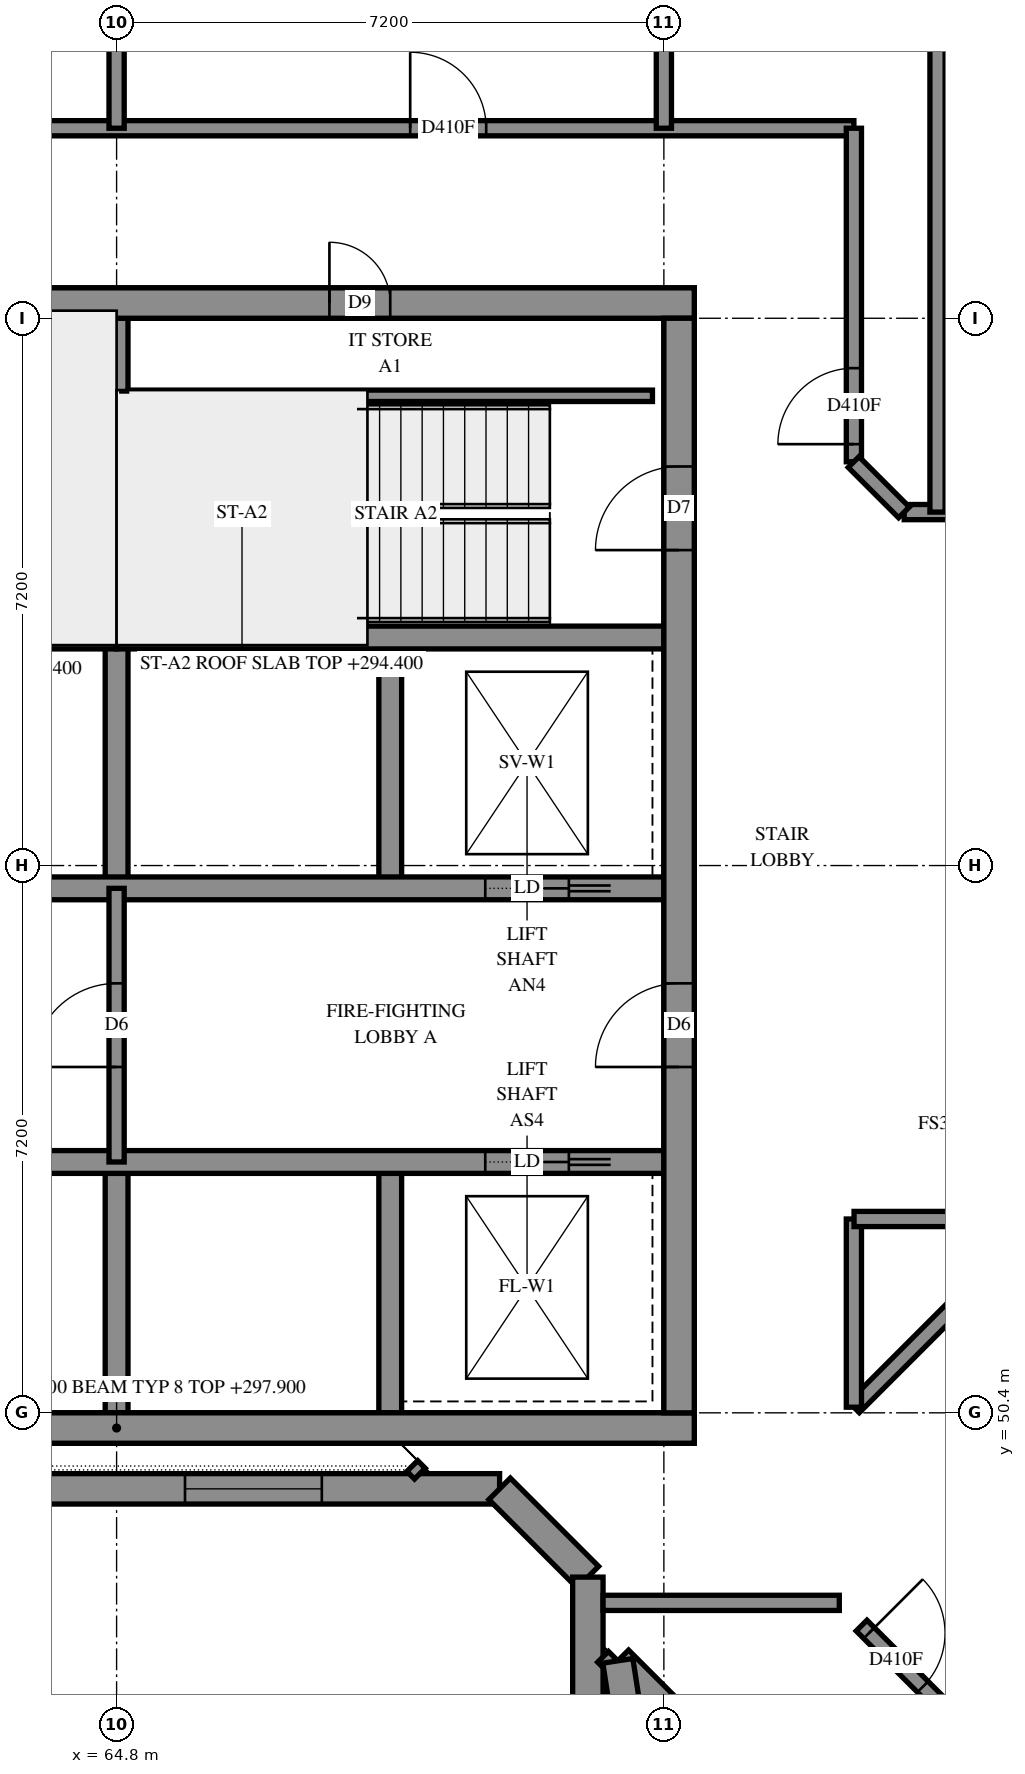
"""IFC4 building model, lengths in metres.
Left out: names, types, materials, properties, quantities, classifications, styles, units other than length and angle.
Written with IfcOpenShell. Run it as: python <this file> out.ifc"""

import sys

from ifc_helpers import new_model, si_unit, direction, frame, frame_2d, origin, place, context, subcontext, project, spatial, polyline, rectangle, outline, extrude, element, fill, save


model = new_model("IFC4")
c1 = context("Model", 3, precision=1e-05, world=origin(), true_north=direction((0.0, 1.0)))
c2 = subcontext(c1, "Body", "Model", "MODEL_VIEW")
j1 = project(units=[si_unit("LENGTHUNIT", "METRE"), si_unit("PLANEANGLEUNIT", "RADIAN")], contexts=[c1])
p1 = place(None, origin())
s1 = spatial("IfcSite", under=j1, at=p1, CompositionType="ELEMENT")
p2 = place(p1, origin())
s2 = spatial("IfcBuilding", under=s1, at=p2, CompositionType="ELEMENT")
p3 = place(p2, frame((0.0, 0.0, 294.4)))
s3 = spatial("IfcBuildingStorey", under=s2, at=p3, CompositionType="ELEMENT", Elevation=294.4)
p4 = place(p3, frame((57.2, 50.2, -0.3), z_axis=(0.0, 0.0, 1.0), x_axis=(1.0, 0.0, 0.0)))
e1 = element("IfcWall", 1, at=p4, inside=s3, PredefinedType="SHEAR", context=c2, shape_type="SweptSolid", body=[
    extrude(outline(polyline([(0.0, 0.0), (15.2, 0.0), (15.2, 3.1), (0.0, 3.1), (0.0, 0.0)])), frame((0.0, 0.2, 0.0), z_axis=(0.0, -1.0, 0.0), x_axis=(1.0, 0.0, 0.0)), (0.0, 0.0, 1.0), 0.4),
])
p5 = place(p3, frame((57.2, 65.0, -0.3), z_axis=(0.0, 0.0, 1.0), x_axis=(1.0, 0.0, 0.0)))
e2 = element("IfcWall", 2, at=p5, inside=s3, PredefinedType="SHEAR", context=c2, shape_type="SweptSolid", body=[
    extrude(outline(polyline([(0.0, 0.0), (15.2, 0.0), (15.2, 3.1), (0.0, 3.1), (0.0, 0.0)])), frame((0.0, 0.2, 0.0), z_axis=(0.0, -1.0, 0.0), x_axis=(1.0, 0.0, 0.0)), (0.0, 0.0, 1.0), 0.4),
])
p6 = place(p5, frame((10.4, 0.0, 0.3)))
e3 = element("IfcOpeningElement", 3, at=p6, cuts=e2, PredefinedType="OPENING", context=c2, shape_type="SweptSolid", body=[
    extrude(rectangle(XDim=0.8, YDim=2.1, at=frame_2d((0.4, 1.05))), frame((0.0, 0.21, 0.0), z_axis=(0.0, -1.0, 0.0), x_axis=(1.0, 0.0, 0.0)), (0.0, 0.0, 1.0), 0.42),
])
p7 = place(p3, frame((72.2, 50.4, -0.3), z_axis=(0.0, 0.0, 1.0), x_axis=(0.0, 1.0, 0.0)))
e4 = element("IfcWall", 4, at=p7, inside=s3, PredefinedType="SHEAR", context=c2, shape_type="SweptSolid", body=[
    extrude(outline(polyline([(0.0, 0.0), (14.4, 0.0), (14.4, 3.1), (0.0, 3.1), (0.0, 0.0)])), frame((0.0, 0.2, 0.0), z_axis=(0.0, -1.0, 0.0), x_axis=(1.0, 0.0, 0.0)), (0.0, 0.0, 1.0), 0.4),
])
p8 = place(p7, frame((4.55, 0.0, 0.3)))
e5 = element("IfcOpeningElement", 5, at=p8, cuts=e4, PredefinedType="OPENING", context=c2, shape_type="SweptSolid", body=[
    extrude(rectangle(XDim=1.1, YDim=2.1, at=frame_2d((0.55, 1.05))), frame((0.0, 0.21, 0.0), z_axis=(0.0, -1.0, 0.0), x_axis=(1.0, 0.0, 0.0)), (0.0, 0.0, 1.0), 0.42),
])
p9 = place(p7, frame((11.35, 0.0, 0.3)))
e6 = element("IfcOpeningElement", 6, at=p9, cuts=e4, PredefinedType="OPENING", context=c2, shape_type="SweptSolid", body=[
    extrude(rectangle(XDim=1.1, YDim=2.1, at=frame_2d((0.55, 1.05))), frame((0.0, 0.21, 0.0), z_axis=(0.0, -1.0, 0.0), x_axis=(1.0, 0.0, 0.0)), (0.0, 0.0, 1.0), 0.42),
])
for number, where, z_axis, x_axis in (
    (7, (64.8, 50.4, 0.0), (0.0, 0.0, 1.0), (0.0, 1.0, 0.0)),
    (8, (64.8, 57.3, 0.0), (0.0, 0.0, 1.0), (0.0, 1.0, 0.0)),
    (9, (68.4, 50.4, 0.0), (0.0, 0.0, 1.0), (0.0, 1.0, 0.0)),
    (10, (68.4, 57.3, 0.0), (0.0, 0.0, 1.0), (0.0, 1.0, 0.0)),
):
    element("IfcWall", number, at=place(p3, frame(where, z_axis=z_axis, x_axis=x_axis)), inside=s3, PredefinedType="SOLIDWALL", context=c2, shape_type="SweptSolid", body=[
        extrude(outline(polyline([(0.0, 0.0), (3.3, 0.0), (3.3, 3.5), (0.0, 3.5), (0.0, 0.0)])), frame((0.0, 0.15, 0.0), z_axis=(0.0, -1.0, 0.0), x_axis=(1.0, 0.0, 0.0)), (0.0, 0.0, 1.0), 0.3),
    ])
p10 = place(p3, frame((57.6, 53.7, 0.0), z_axis=(0.0, 0.0, 1.0), x_axis=(1.0, 0.0, 0.0)))
e11 = element("IfcWall", 11, at=p10, inside=s3, PredefinedType="SOLIDWALL", context=c2, shape_type="SweptSolid", body=[
    extrude(outline(polyline([(0.0, 0.0), (14.4, 0.0), (14.4, 3.5), (0.0, 3.5), (0.0, 0.0)])), frame((0.0, 0.15, 0.0), z_axis=(0.0, -1.0, 0.0), x_axis=(1.0, 0.0, 0.0)), (0.0, 0.0, 1.0), 0.3),
])
p11 = place(p10, frame((12.05, 0.0, 0.0)))
e12 = element("IfcOpeningElement", 12, at=p11, cuts=e11, PredefinedType="OPENING", context=c2, shape_type="SweptSolid", body=[
    extrude(rectangle(XDim=1.1, YDim=2.1, at=frame_2d((0.55, 1.05))), frame((0.0, 0.16, 0.0), z_axis=(0.0, -1.0, 0.0), x_axis=(1.0, 0.0, 0.0)), (0.0, 0.0, 1.0), 0.32),
])
p12 = place(p3, frame((57.6, 57.3, 0.0), z_axis=(0.0, 0.0, 1.0), x_axis=(1.0, 0.0, 0.0)))
e13 = element("IfcWall", 13, at=p12, inside=s3, PredefinedType="SOLIDWALL", context=c2, shape_type="SweptSolid", body=[
    extrude(outline(polyline([(0.0, 0.0), (14.4, 0.0), (14.4, 3.5), (0.0, 3.5), (0.0, 0.0)])), frame((0.0, 0.15, 0.0), z_axis=(0.0, -1.0, 0.0), x_axis=(1.0, 0.0, 0.0)), (0.0, 0.0, 1.0), 0.3),
])
p13 = place(p12, frame((12.05, 0.0, 0.0)))
e14 = element("IfcOpeningElement", 14, at=p13, cuts=e13, PredefinedType="OPENING", context=c2, shape_type="SweptSolid", body=[
    extrude(rectangle(XDim=1.1, YDim=2.1, at=frame_2d((0.55, 1.05))), frame((0.0, 0.16, 0.0), z_axis=(0.0, -1.0, 0.0), x_axis=(1.0, 0.0, 0.0)), (0.0, 0.0, 1.0), 0.32),
])
for number, where, z_axis, x_axis in (
    (15, (57.6, 60.6, 0.0), (0.0, 0.0, 1.0), (1.0, 0.0, 0.0)),
    (16, (64.8, 60.6, 0.0), (0.0, 0.0, 1.0), (1.0, 0.0, 0.0)),
):
    element("IfcWall", number, at=place(p3, frame(where, z_axis=z_axis, x_axis=x_axis)), inside=s3, PredefinedType="SOLIDWALL", context=c2, shape_type="SweptSolid", body=[
        extrude(outline(polyline([(0.0, 0.0), (7.2, 0.0), (7.2, 3.5), (0.0, 3.5), (0.0, 0.0)])), frame((0.0, 0.15, 0.0), z_axis=(0.0, -1.0, 0.0), x_axis=(1.0, 0.0, 0.0)), (0.0, 0.0, 1.0), 0.3),
    ])
p14 = place(p3, frame((64.8, 60.6, 0.0), z_axis=(0.0, 0.0, 1.0), x_axis=(0.0, 1.0, 0.0)))
e17 = element("IfcWall", 17, at=p14, inside=s3, PredefinedType="SOLIDWALL", context=c2, shape_type="SweptSolid", body=[
    extrude(outline(polyline([(0.0, 0.0), (4.2, 0.0), (4.2, 3.5), (0.0, 3.5), (0.0, 0.0)])), frame((0.0, 0.15, 0.0), z_axis=(0.0, -1.0, 0.0), x_axis=(1.0, 0.0, 0.0)), (0.0, 0.0, 1.0), 0.3),
])
p15 = place(p3, frame((56.6, 49.4, 0.0), z_axis=(0.0, 0.0, 1.0), x_axis=(1.0, 0.0, 0.0)))
e18 = element("IfcWall", 18, at=p15, inside=s3, PredefinedType="SOLIDWALL", context=c2, shape_type="SweptSolid", body=[
    extrude(outline(polyline([(-0.2, -0.2), (13.156, -0.2), (13.322, 0.2), (0.2, 0.2), (-0.2, -0.2)])), origin(), (0.0, 0.0, 1.0), 3.5),
])
p16 = place(p15, frame((1.9, 0.0, 0.7)))
e19 = element("IfcOpeningElement", 19, at=p16, cuts=e18, PredefinedType="OPENING", context=c2, shape_type="SweptSolid", body=[
    extrude(rectangle(XDim=1.8, YDim=2.2, at=frame_2d((0.9, 1.1))), frame((0.0, 0.21, 0.0), z_axis=(0.0, -1.0, 0.0), x_axis=(1.0, 0.0, 0.0)), (0.0, 0.0, 1.0), 0.42),
])
p17 = place(p15, frame((5.5, 0.0, 0.7)))
e20 = element("IfcOpeningElement", 20, at=p17, cuts=e18, PredefinedType="OPENING", context=c2, shape_type="SweptSolid", body=[
    extrude(rectangle(XDim=1.8, YDim=2.2, at=frame_2d((0.9, 1.1))), frame((0.0, 0.21, 0.0), z_axis=(0.0, -1.0, 0.0), x_axis=(1.0, 0.0, 0.0)), (0.0, 0.0, 1.0), 0.42),
])
p18 = place(p15, frame((9.1, 0.0, 0.7)))
e21 = element("IfcOpeningElement", 21, at=p18, cuts=e18, PredefinedType="OPENING", context=c2, shape_type="SweptSolid", body=[
    extrude(rectangle(XDim=1.8, YDim=2.2, at=frame_2d((0.9, 1.1))), frame((0.0, 0.21, 0.0), z_axis=(0.0, -1.0, 0.0), x_axis=(1.0, 0.0, 0.0)), (0.0, 0.0, 1.0), 0.42),
])
p19 = place(p3, frame((69.839, 49.4, 0.0), z_axis=(0.0, 0.0, 1.0), x_axis=(0.7071067812, -0.7071067812, 0.0)))
e22 = element("IfcWall", 22, at=p19, inside=s3, PredefinedType="SOLIDWALL", context=c2, shape_type="SweptSolid", body=[
    extrude(outline(polyline([(0.083, -0.2), (1.559, -0.2), (1.725, 0.2), (-0.083, 0.2), (0.083, -0.2)])), origin(), (0.0, 0.0, 1.0), 3.5),
])
p20 = place(p3, frame((71.0, 48.239, 0.0), z_axis=(0.0, 0.0, 1.0), x_axis=(0.0, -1.0, 0.0)))
e23 = element("IfcWall", 23, at=p20, inside=s3, PredefinedType="SOLIDWALL", context=c2, shape_type="SweptSolid", body=[
    extrude(outline(polyline([(0.083, -0.2), (6.239, -0.2), (5.839, 0.2), (-0.083, 0.2), (0.083, -0.2)])), origin(), (0.0, 0.0, 1.0), 3.5),
])
p21 = place(p20, frame((2.339, 0.0, 0.7)))
e24 = element("IfcOpeningElement", 24, at=p21, cuts=e23, PredefinedType="OPENING", context=c2, shape_type="SweptSolid", body=[
    extrude(rectangle(XDim=1.8, YDim=2.2, at=frame_2d((0.9, 1.1))), frame((0.0, 0.21, 0.0), z_axis=(0.0, -1.0, 0.0), x_axis=(1.0, 0.0, 0.0)), (0.0, 0.0, 1.0), 0.42),
])
p22 = place(p3, frame((68.79, 49.6, 0.0), z_axis=(0.0, 0.0, 1.0), x_axis=(-0.7071067812, 0.7071067812, 0.0)))
e25 = element("IfcWall", 25, at=p22, inside=s3, PredefinedType="PARAPET", context=c2, shape_type="SweptSolid", body=[
    extrude(outline(polyline([(0.0, -0.1), (0.141, -0.1), (0.141, 0.1), (0.0, 0.1), (0.0, -0.1)])), origin(), (0.0, 0.0, 1.0), 0.25),
])
p23 = place(p3, frame((75.99, 42.4, 0.0), z_axis=(0.0, 0.0, 1.0), x_axis=(-0.7071067812, 0.7071067812, 0.0)))
e26 = element("IfcWall", 26, at=p23, inside=s3, PredefinedType="PARAPET", context=c2, shape_type="SweptSolid", body=[
    extrude(outline(polyline([(0.0, -0.1), (6.774, -0.1), (6.774, 0.1), (0.0, 0.1), (0.0, -0.1)])), origin(), (0.0, 0.0, 1.0), 0.25),
])
p24 = place(p3, frame((64.95, 63.78, 0.0), z_axis=(0.0, 0.0, 1.0), x_axis=(1.0, 0.0, 0.0)))
e27 = element("IfcWall", 27, at=p24, inside=s3, PredefinedType="PARTITIONING", context=c2, shape_type="SweptSolid", body=[
    extrude(outline(polyline([(0.0, 0.0), (6.9, 0.0), (6.9, 3.5), (0.0, 3.5), (0.0, 0.0)])), frame((0.0, 0.075, 0.0), z_axis=(0.0, -1.0, 0.0), x_axis=(1.0, 0.0, 0.0)), (0.0, 0.0, 1.0), 0.15),
])
p25 = place(p3, frame((64.8, 53.7, 0.0), z_axis=(0.0, 0.0, 1.0), x_axis=(0.0, 1.0, 0.0)))
e28 = element("IfcWall", 28, at=p25, inside=s3, PredefinedType="PARTITIONING", context=c2, shape_type="SweptSolid", body=[
    extrude(outline(polyline([(0.0, 0.0), (3.6, 0.0), (3.6, 3.5), (0.0, 3.5), (0.0, 0.0)])), frame((0.0, 0.1, 0.0), z_axis=(0.0, -1.0, 0.0), x_axis=(1.0, 0.0, 0.0)), (0.0, 0.0, 1.0), 0.2),
])
p26 = place(p25, frame((1.25, 0.0, 0.0)))
e29 = element("IfcOpeningElement", 29, at=p26, cuts=e28, PredefinedType="OPENING", context=c2, shape_type="SweptSolid", body=[
    extrude(rectangle(XDim=1.1, YDim=2.1, at=frame_2d((0.55, 1.05))), frame((0.0, 0.11, 0.0), z_axis=(0.0, -1.0, 0.0), x_axis=(1.0, 0.0, 0.0)), (0.0, 0.0, 1.0), 0.22),
])
p27 = place(p3, frame((55.102, 67.3, 0.0), z_axis=(0.0, 0.0, 1.0), x_axis=(1.0, 0.0, 0.0)))
e30 = element("IfcWall", 30, at=p27, inside=s3, PredefinedType="PARTITIONING", context=c2, shape_type="SweptSolid", body=[
    extrude(rectangle(XDim=19.398, YDim=0.2, at=frame_2d((9.699, 0.0))), origin(), (0.0, 0.0, 1.0), 3.5),
])
p28 = place(p27, frame((6.361, 0.0, 0.0)))
e31 = element("IfcOpeningElement", 31, at=p28, cuts=e30, PredefinedType="OPENING", context=c2, shape_type="SweptSolid", body=[
    extrude(rectangle(XDim=1.0, YDim=2.1, at=frame_2d((0.5, 1.05))), frame((0.0, 0.11, 0.0), z_axis=(0.0, -1.0, 0.0), x_axis=(1.0, 0.0, 0.0)), (0.0, 0.0, 1.0), 0.22),
])
p29 = place(p27, frame((13.56, 0.0, 0.0)))
e32 = element("IfcOpeningElement", 32, at=p29, cuts=e30, PredefinedType="OPENING", context=c2, shape_type="SweptSolid", body=[
    extrude(rectangle(XDim=1.0, YDim=2.1, at=frame_2d((0.5, 1.05))), frame((0.0, 0.11, 0.0), z_axis=(0.0, -1.0, 0.0), x_axis=(1.0, 0.0, 0.0)), (0.0, 0.0, 1.0), 0.22),
])
p30 = place(p3, frame((74.5, 62.912, 0.0), z_axis=(0.0, 0.0, 1.0), x_axis=(0.0, 1.0, 0.0)))
e33 = element("IfcWall", 33, at=p30, inside=s3, PredefinedType="PARTITIONING", context=c2, shape_type="SweptSolid", body=[
    extrude(rectangle(XDim=4.388, YDim=0.2, at=frame_2d((2.194, 0.0))), origin(), (0.0, 0.0, 1.0), 3.5),
])
p31 = place(p30, frame((0.232, 0.0, 0.0)))
e34 = element("IfcOpeningElement", 34, at=p31, cuts=e33, PredefinedType="OPENING", context=c2, shape_type="SweptSolid", body=[
    extrude(rectangle(XDim=1.0, YDim=2.1, at=frame_2d((0.5, 1.05))), frame((0.0, 0.11, 0.0), z_axis=(0.0, -1.0, 0.0), x_axis=(1.0, 0.0, 0.0)), (0.0, 0.0, 1.0), 0.22),
])
for number, where, z_axis, x_axis in (
    (35, (64.8, 67.3, 0.0), (0.0, 0.0, 1.0), (0.0, 1.0, 0.0)),
    (36, (72.0, 67.3, 0.0), (0.0, 0.0, 1.0), (0.0, 1.0, 0.0)),
):
    element("IfcWall", number, at=place(p3, frame(where, z_axis=z_axis, x_axis=x_axis)), inside=s3, PredefinedType="PARTITIONING", context=c2, shape_type="SweptSolid", body=[
        extrude(rectangle(XDim=5.05, YDim=0.2, at=frame_2d((2.525, 0.0))), origin(), (0.0, 0.0, 1.0), 3.5),
    ])
p32 = place(p3, frame((74.601, 47.601, 0.0), z_axis=(0.0, 0.0, 1.0), x_axis=(0.7071067812, -0.7071067812, 0.0)))
e37 = element("IfcWall", 37, at=p32, inside=s3, PredefinedType="PARTITIONING", context=c2, shape_type="SweptSolid", body=[
    extrude(rectangle(XDim=4.237, YDim=0.2, at=frame_2d((2.119, 0.0))), origin(), (0.0, 0.0, 1.0), 3.5),
])
p33 = place(p32, frame((0.139, 0.0, 0.0)))
e38 = element("IfcOpeningElement", 38, at=p33, cuts=e37, PredefinedType="OPENING", context=c2, shape_type="SweptSolid", body=[
    extrude(rectangle(XDim=1.0, YDim=2.1, at=frame_2d((0.5, 1.05))), frame((0.0, 0.11, 0.0), z_axis=(0.0, -1.0, 0.0), x_axis=(1.0, 0.0, 0.0)), (0.0, 0.0, 1.0), 0.22),
])
p34 = place(p3, frame((75.162, 62.25, 0.0), z_axis=(0.0, 0.0, 1.0), x_axis=(1.0, 0.0, 0.0)))
e39 = element("IfcWall", 39, at=p34, inside=s3, PredefinedType="PARTITIONING", context=c2, shape_type="SweptSolid", body=[
    extrude(rectangle(XDim=4.038, YDim=0.2, at=frame_2d((2.019, 0.0))), origin(), (0.0, 0.0, 1.0), 3.5),
])
p35 = place(p34, frame((1.006, 0.0, 0.0)))
e40 = element("IfcOpeningElement", 40, at=p35, cuts=e39, PredefinedType="OPENING", context=c2, shape_type="SweptSolid", body=[
    extrude(rectangle(XDim=1.0, YDim=2.1, at=frame_2d((0.5, 1.05))), frame((0.0, 0.11, 0.0), z_axis=(0.0, -1.0, 0.0), x_axis=(1.0, 0.0, 0.0)), (0.0, 0.0, 1.0), 0.22),
])
p36 = place(p3, frame((74.501, 50.473, 0.0), z_axis=(0.0, 0.0, 1.0), x_axis=(0.7071067812, 0.7071067812, 0.0)))
e41 = element("IfcWall", 41, at=p36, inside=s3, PredefinedType="PARTITIONING", context=c2, shape_type="SweptSolid", body=[
    extrude(rectangle(XDim=3.502, YDim=0.2, at=frame_2d((1.751, 0.0))), origin(), (0.0, 0.0, 1.0), 3.5),
])
p37 = place(p3, frame((74.5, 50.474, 0.0), z_axis=(0.0, 0.0, 1.0), x_axis=(0.0, 1.0, 0.0)))
e42 = element("IfcWall", 42, at=p37, inside=s3, PredefinedType="PARTITIONING", context=c2, shape_type="SweptSolid", body=[
    extrude(rectangle(XDim=2.476, YDim=0.2, at=frame_2d((1.238, 0.0))), origin(), (0.0, 0.0, 1.0), 3.5),
])
p38 = place(p3, frame((74.502, 52.95, 0.0), z_axis=(0.0, 0.0, 1.0), x_axis=(1.0, 0.0, 0.0)))
e43 = element("IfcWall", 43, at=p38, inside=s3, PredefinedType="PARTITIONING", context=c2, shape_type="SweptSolid", body=[
    extrude(rectangle(XDim=2.474, YDim=0.2, at=frame_2d((1.237, 0.0))), origin(), (0.0, 0.0, 1.0), 3.5),
])
p39 = place(p3, frame((74.496, 62.908, 0.0), z_axis=(0.0, 0.0, 1.0), x_axis=(0.7071067812, -0.7071067812, 0.0)))
e44 = element("IfcWall", 44, at=p39, inside=s3, PredefinedType="PARTITIONING", context=c2, shape_type="SweptSolid", body=[
    extrude(rectangle(XDim=0.936, YDim=0.2, at=frame_2d((0.468, 0.0))), origin(), (0.0, 0.0, 1.0), 3.5),
])
p40 = place(p3, frame((75.6, 62.25, 0.0), z_axis=(0.0, 0.0, 1.0), x_axis=(0.0, 1.0, 0.0)))
e45 = element("IfcWall", 45, at=p40, inside=s3, PredefinedType="PARTITIONING", context=c2, shape_type="SweptSolid", body=[
    extrude(outline(polyline([(0.0, -0.1), (10.55, -0.1), (10.55, 0.1), (0.0, 0.1), (0.0, -0.1)])), origin(), (0.0, 0.0, 1.0), 3.5),
])
p41 = place(p3, frame((71.2, 47.9, 0.0), z_axis=(0.0, 0.0, 1.0), x_axis=(1.0, 0.0, 0.0)))
e46 = element("IfcWall", 46, at=p41, inside=s3, PredefinedType="PARTITIONING", context=c2, shape_type="SweptSolid", body=[
    extrude(outline(polyline([(0.0, -0.1), (3.108, -0.1), (3.108, 0.1), (0.0, 0.1), (0.0, -0.1)])), origin(), (0.0, 0.0, 1.0), 3.5),
])
p42 = place(p18, origin())
e47 = element("IfcWindow", 47, at=p42, inside=s3, PartitioningType="SINGLE_PANEL", PredefinedType="WINDOW", context=c2, shape_type="SweptSolid", body=[
    extrude(rectangle(XDim=1.8, YDim=2.2, at=frame_2d((0.9, 1.1))), frame((0.0, 0.08, 0.0), z_axis=(0.0, -1.0, 0.0), x_axis=(1.0, 0.0, 0.0)), (0.0, 0.0, 1.0), 0.06),
])
fill(e21, e47)
p43 = place(p6, origin())
e48 = element("IfcDoor", 48, at=p43, inside=s3, OperationType="SINGLE_SWING_RIGHT", PredefinedType="DOOR", context=c2, shape_type="SweptSolid", body=[
    extrude(rectangle(XDim=0.8, YDim=2.1, at=frame_2d((0.4, 1.05))), frame((0.0, 0.025, 0.0), z_axis=(0.0, -1.0, 0.0), x_axis=(1.0, 0.0, 0.0)), (0.0, 0.0, 1.0), 0.05),
])
fill(e3, e48)
p44 = place(p8, origin())
e49 = element("IfcDoor", 49, at=p44, inside=s3, OperationType="DOUBLE_DOOR_SINGLE_SWING", PredefinedType="DOOR", context=c2, shape_type="SweptSolid", body=[
    extrude(rectangle(XDim=1.1, YDim=2.1, at=frame_2d((0.55, 1.05))), frame((0.0, 0.025, 0.0), z_axis=(0.0, -1.0, 0.0), x_axis=(1.0, 0.0, 0.0)), (0.0, 0.0, 1.0), 0.05),
])
fill(e5, e49)
p45 = place(p9, origin())
e50 = element("IfcDoor", 50, at=p45, inside=s3, OperationType="SINGLE_SWING_RIGHT", PredefinedType="DOOR", context=c2, shape_type="SweptSolid", body=[
    extrude(rectangle(XDim=1.1, YDim=2.1, at=frame_2d((0.55, 1.05))), frame((0.0, 0.025, 0.0), z_axis=(0.0, -1.0, 0.0), x_axis=(1.0, 0.0, 0.0)), (0.0, 0.0, 1.0), 0.05),
])
fill(e6, e50)
p46 = place(p26, origin())
e51 = element("IfcDoor", 51, at=p46, inside=s3, OperationType="DOUBLE_DOOR_SINGLE_SWING", PredefinedType="DOOR", context=c2, shape_type="SweptSolid", body=[
    extrude(rectangle(XDim=1.1, YDim=2.1, at=frame_2d((0.55, 1.05))), frame((0.0, 0.025, 0.0), z_axis=(0.0, -1.0, 0.0), x_axis=(1.0, 0.0, 0.0)), (0.0, 0.0, 1.0), 0.05),
])
fill(e29, e51)
p47 = place(p11, origin())
e52 = element("IfcDoor", 52, at=p47, inside=s3, OperationType="SLIDING_TO_RIGHT", PredefinedType="DOOR", context=c2, shape_type="SweptSolid", body=[
    extrude(rectangle(XDim=1.1, YDim=2.1, at=frame_2d((0.55, 1.05))), frame((0.0, 0.025, 0.0), z_axis=(0.0, -1.0, 0.0), x_axis=(1.0, 0.0, 0.0)), (0.0, 0.0, 1.0), 0.05),
])
fill(e12, e52)
p48 = place(p13, origin())
e53 = element("IfcDoor", 53, at=p48, inside=s3, OperationType="SLIDING_TO_RIGHT", PredefinedType="DOOR", context=c2, shape_type="SweptSolid", body=[
    extrude(rectangle(XDim=1.1, YDim=2.1, at=frame_2d((0.55, 1.05))), frame((0.0, 0.025, 0.0), z_axis=(0.0, -1.0, 0.0), x_axis=(1.0, 0.0, 0.0)), (0.0, 0.0, 1.0), 0.05),
])
fill(e14, e53)
p49 = place(p33, origin())
e54 = element("IfcDoor", 54, at=p49, inside=s3, OperationType="SINGLE_SWING_LEFT", PredefinedType="DOOR", context=c2, shape_type="SweptSolid", body=[
    extrude(rectangle(XDim=1.0, YDim=2.1, at=frame_2d((0.5, 1.05))), frame((0.0, 0.025, 0.0), z_axis=(0.0, -1.0, 0.0), x_axis=(1.0, 0.0, 0.0)), (0.0, 0.0, 1.0), 0.05),
])
fill(e38, e54)
p50 = place(p29, origin())
e55 = element("IfcDoor", 55, at=p50, inside=s3, OperationType="SINGLE_SWING_RIGHT", PredefinedType="DOOR", context=c2, shape_type="SweptSolid", body=[
    extrude(rectangle(XDim=1.0, YDim=2.1, at=frame_2d((0.5, 1.05))), frame((0.0, 0.025, 0.0), z_axis=(0.0, -1.0, 0.0), x_axis=(1.0, 0.0, 0.0)), (0.0, 0.0, 1.0), 0.05),
])
fill(e32, e55)
p51 = place(p31, origin())
e56 = element("IfcDoor", 56, at=p51, inside=s3, OperationType="SINGLE_SWING_RIGHT", PredefinedType="DOOR", context=c2, shape_type="SweptSolid", body=[
    extrude(rectangle(XDim=1.0, YDim=2.1, at=frame_2d((0.5, 1.05))), frame((0.0, 0.025, 0.0), z_axis=(0.0, -1.0, 0.0), x_axis=(1.0, 0.0, 0.0)), (0.0, 0.0, 1.0), 0.05),
])
fill(e34, e56)
save(model, sys.argv[1])
